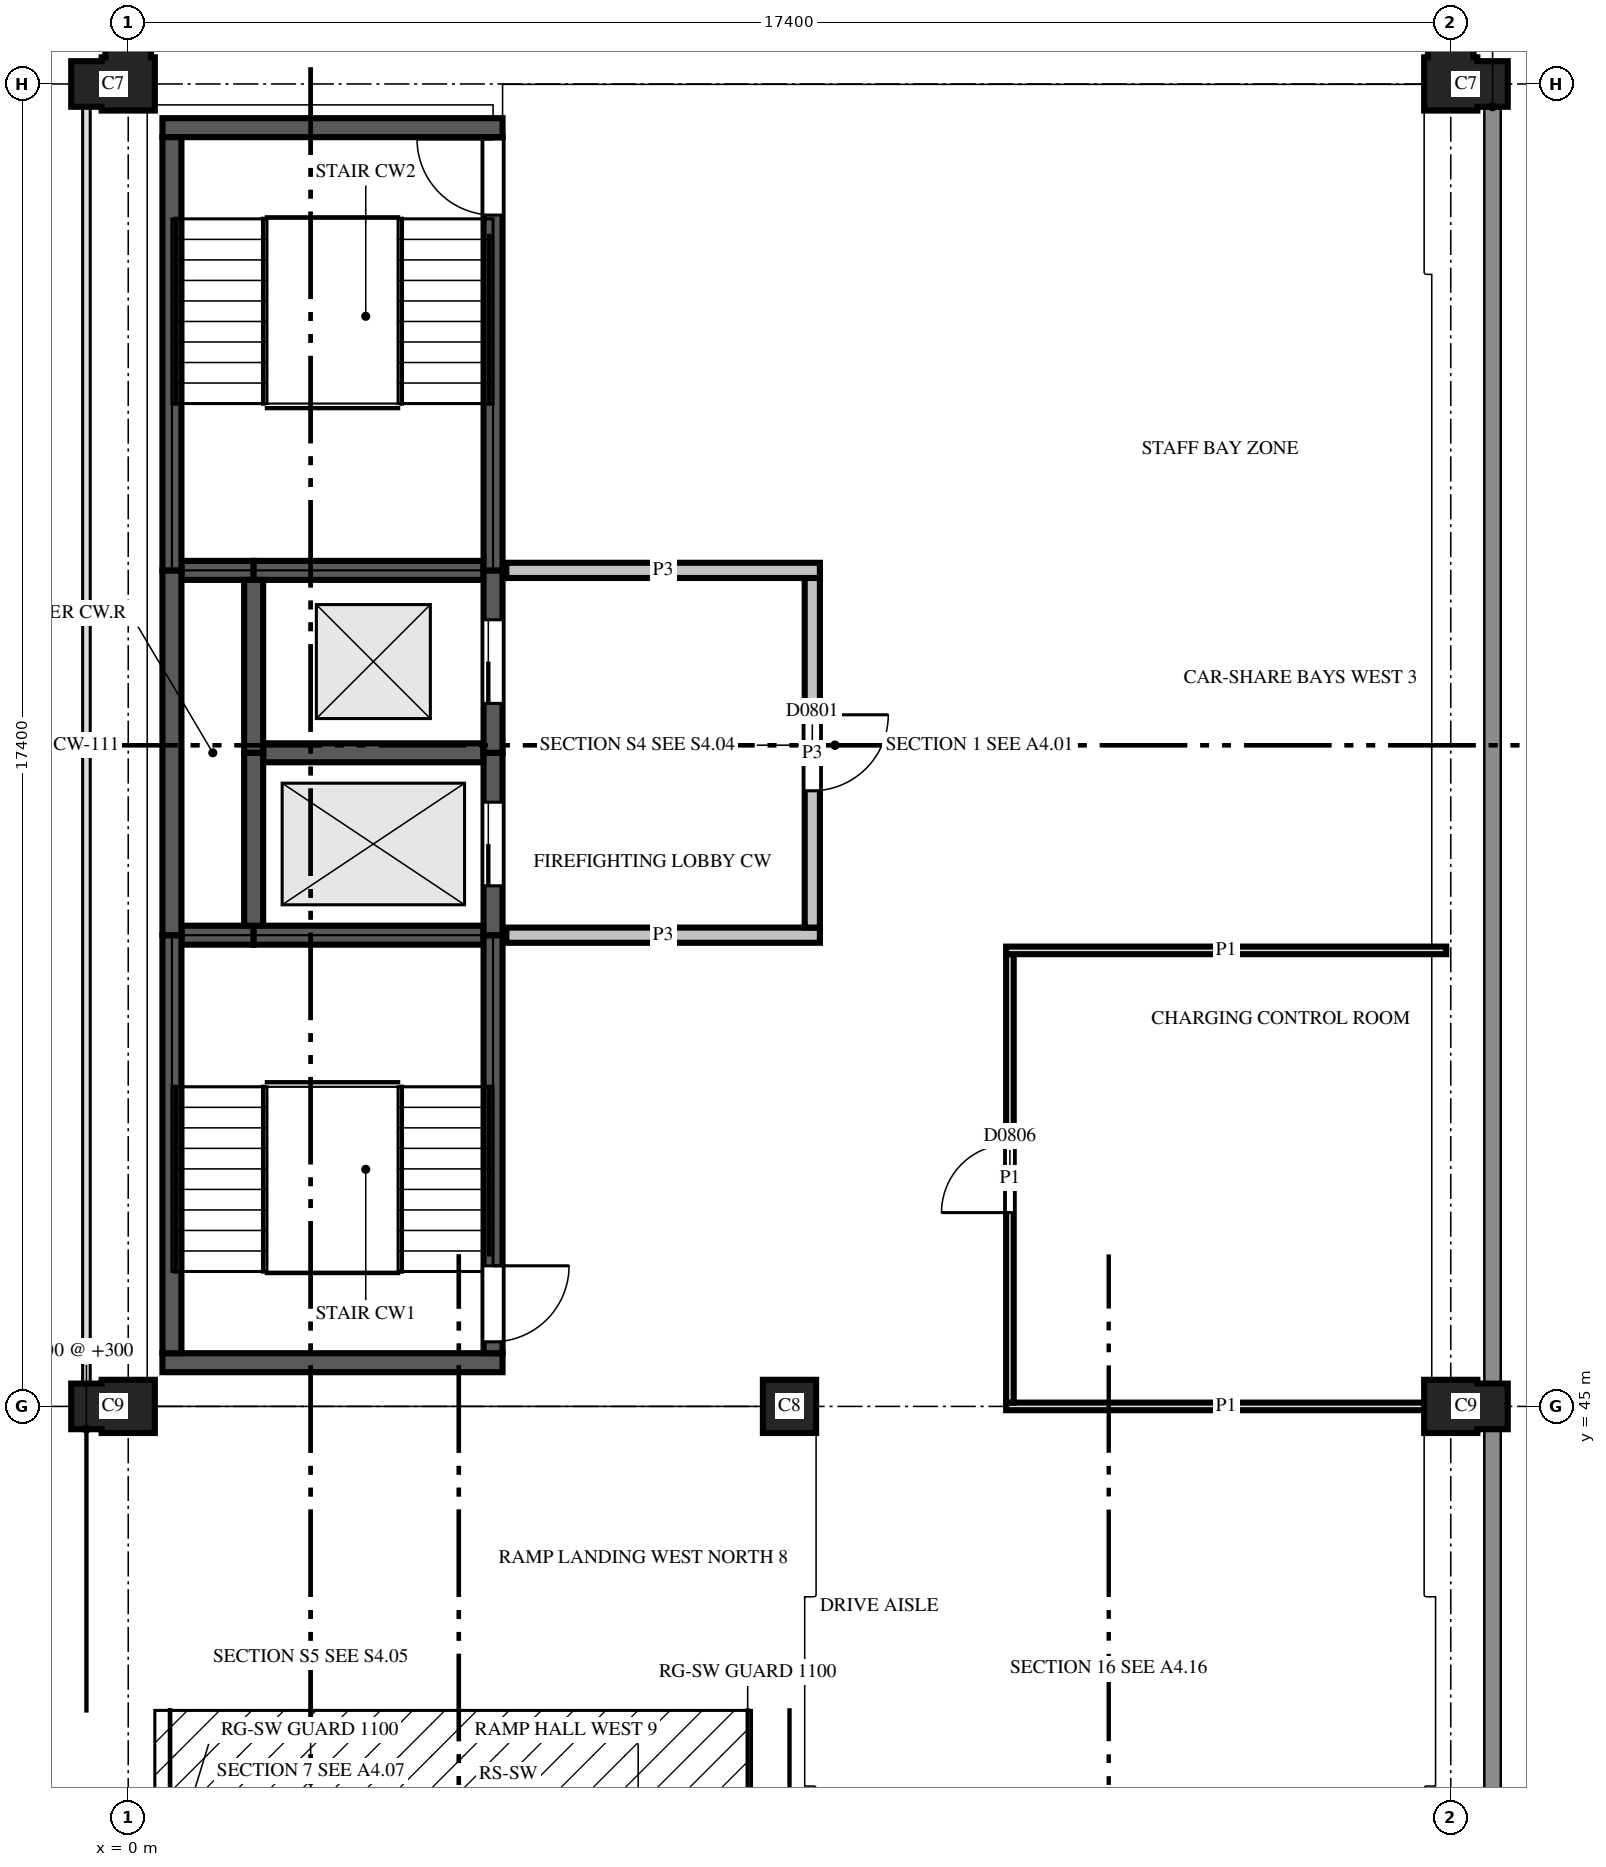
"""IFC4 building model, lengths in metres.
Left out: names, types, materials, properties, quantities, classifications, styles, units other than length and angle.
Written with IfcOpenShell. Run it as: python <this file> out.ifc"""

import sys

from ifc_helpers import new_model, si_unit, direction, frame, frame_2d, origin, place, context, subcontext, project, spatial, polyline, rectangle, outline, extrude, element, fill, save


model = new_model("IFC4")
c1 = context("Model", 3, precision=1e-05, world=origin(), true_north=direction((0.0, 1.0)))
c2 = subcontext(c1, "Body", "Model", "MODEL_VIEW")
j1 = project(units=[si_unit("LENGTHUNIT", "METRE"), si_unit("PLANEANGLEUNIT", "RADIAN")], contexts=[c1])
p1 = place(None, origin())
s1 = spatial("IfcSite", under=j1, at=p1, CompositionType="ELEMENT")
p2 = place(p1, origin())
s2 = spatial("IfcBuilding", under=s1, at=p2, CompositionType="ELEMENT")
p3 = place(p2, frame((0.0, 0.0, 30.4)))
s3 = spatial("IfcBuildingStorey", under=s2, at=p3, CompositionType="ELEMENT", Elevation=30.4)
p4 = place(p3, frame((0.0, 45.0, 0.0), z_axis=(0.0, 0.0, 1.0), x_axis=(-1.0, 0.0, 0.0)))
e1 = element("IfcColumn", 1, at=p4, inside=s3, PredefinedType="COLUMN", context=c2, shape_type="SweptSolid", body=[
    extrude(outline(polyline([(-0.35, -0.35), (0.35, -0.35), (0.35, -0.3), (0.75, -0.3), (0.75, 0.3), (0.35, 0.3), (0.35, 0.35), (-0.35, 0.35), (-0.35, -0.35)])), origin(), (0.0, 0.0, 1.0), 3.7),
])
p5 = place(p3, frame((8.7, 45.0, 0.0), z_axis=(0.0, 0.0, 1.0), x_axis=(1.0, 0.0, 0.0)))
e2 = element("IfcColumn", 2, at=p5, inside=s3, PredefinedType="COLUMN", context=c2, shape_type="SweptSolid", body=[
    extrude(outline(polyline([(-0.35, -0.35), (0.35, -0.35), (0.35, 0.35), (-0.35, 0.35), (-0.35, -0.35)])), origin(), (0.0, 0.0, 1.0), 3.7),
])
p6 = place(p3, frame((17.4, 45.0, 0.0), z_axis=(0.0, 0.0, 1.0), x_axis=(1.0, 0.0, 0.0)))
e3 = element("IfcColumn", 3, at=p6, inside=s3, PredefinedType="COLUMN", context=c2, shape_type="SweptSolid", body=[
    extrude(outline(polyline([(-0.35, -0.35), (0.35, -0.35), (0.35, -0.3), (0.75, -0.3), (0.75, 0.3), (0.35, 0.3), (0.35, 0.35), (-0.35, 0.35), (-0.35, -0.35)])), origin(), (0.0, 0.0, 1.0), 3.7),
])
for number, where, z_axis, x_axis in (
    (4, (0.0, 62.4, 0.0), (0.0, 0.0, 1.0), (0.0, 1.0, 0.0)),
    (5, (17.4, 62.4, 0.0), (0.0, 0.0, 1.0), (1.0, 0.0, 0.0)),
):
    element("IfcColumn", number, at=place(p3, frame(where, z_axis=z_axis, x_axis=x_axis)), inside=s3, PredefinedType="COLUMN", context=c2, shape_type="SweptSolid", body=[
        extrude(outline(polyline([(-0.35, -0.35), (0.35, -0.35), (0.35, -0.3), (0.75, -0.3), (0.75, 0.3), (0.35, 0.3), (0.35, 0.35), (0.3, 0.35), (0.3, 0.75), (-0.3, 0.75), (-0.3, 0.35), (-0.35, 0.35), (-0.35, -0.35)])), origin(), (0.0, 0.0, 1.0), 3.7),
    ])
p7 = place(p3, frame((0.45, 45.575, 0.0), z_axis=(0.0, 0.0, 1.0), x_axis=(1.0, 0.0, 0.0)))
e6 = element("IfcWall", 6, at=p7, inside=s3, PredefinedType="SHEAR", context=c2, shape_type="SweptSolid", body=[
    extrude(rectangle(XDim=4.475, YDim=0.25, at=frame_2d((2.238, 0.0))), origin(), (0.0, 0.0, 1.0), 3.7),
])
p8 = place(p3, frame((0.7, 51.2, 0.0), z_axis=(0.0, 0.0, 1.0), x_axis=(1.0, 0.0, 0.0)))
e7 = element("IfcWall", 7, at=p8, inside=s3, PredefinedType="SHEAR", context=c2, shape_type="SweptSolid", body=[
    extrude(rectangle(XDim=0.95, YDim=0.25, at=frame_2d((0.475, 0.0))), origin(), (0.0, 0.0, 1.0), 3.7),
])
p9 = place(p3, frame((1.65, 51.2, 0.0), z_axis=(0.0, 0.0, 1.0), x_axis=(1.0, 0.0, 0.0)))
e8 = element("IfcWall", 8, at=p9, inside=s3, PredefinedType="SHEAR", context=c2, shape_type="SweptSolid", body=[
    extrude(rectangle(XDim=3.025, YDim=0.25, at=frame_2d((1.513, 0.0))), origin(), (0.0, 0.0, 1.0), 3.7),
])
p10 = place(p3, frame((1.775, 53.6, 0.0), z_axis=(0.0, 0.0, 1.0), x_axis=(1.0, 0.0, 0.0)))
e9 = element("IfcWall", 9, at=p10, inside=s3, PredefinedType="SHEAR", context=c2, shape_type="SweptSolid", body=[
    extrude(rectangle(XDim=2.9, YDim=0.25, at=frame_2d((1.45, 0.0))), origin(), (0.0, 0.0, 1.0), 3.7),
])
p11 = place(p3, frame((0.7, 56.0, 0.0), z_axis=(0.0, 0.0, 1.0), x_axis=(1.0, 0.0, 0.0)))
e10 = element("IfcWall", 10, at=p11, inside=s3, PredefinedType="SHEAR", context=c2, shape_type="SweptSolid", body=[
    extrude(rectangle(XDim=0.95, YDim=0.25, at=frame_2d((0.475, 0.0))), origin(), (0.0, 0.0, 1.0), 3.7),
])
p12 = place(p3, frame((1.65, 56.0, 0.0), z_axis=(0.0, 0.0, 1.0), x_axis=(1.0, 0.0, 0.0)))
e11 = element("IfcWall", 11, at=p12, inside=s3, PredefinedType="SHEAR", context=c2, shape_type="SweptSolid", body=[
    extrude(rectangle(XDim=3.025, YDim=0.25, at=frame_2d((1.513, 0.0))), origin(), (0.0, 0.0, 1.0), 3.7),
])
p13 = place(p3, frame((0.45, 61.825, 0.0), z_axis=(0.0, 0.0, 1.0), x_axis=(1.0, 0.0, 0.0)))
e12 = element("IfcWall", 12, at=p13, inside=s3, PredefinedType="SHEAR", context=c2, shape_type="SweptSolid", body=[
    extrude(rectangle(XDim=4.475, YDim=0.25, at=frame_2d((2.238, 0.0))), origin(), (0.0, 0.0, 1.0), 3.7),
])
p14 = place(p3, frame((0.575, 45.7, 0.0), z_axis=(0.0, 0.0, 1.0), x_axis=(0.0, 1.0, 0.0)))
e13 = element("IfcWall", 13, at=p14, inside=s3, PredefinedType="SHEAR", context=c2, shape_type="SweptSolid", body=[
    extrude(rectangle(XDim=5.5, YDim=0.25, at=frame_2d((2.75, 0.0))), origin(), (0.0, 0.0, 1.0), 3.7),
])
p15 = place(p3, frame((0.575, 51.2, 0.0), z_axis=(0.0, 0.0, 1.0), x_axis=(0.0, 1.0, 0.0)))
e14 = element("IfcWall", 14, at=p15, inside=s3, PredefinedType="SHEAR", context=c2, shape_type="SweptSolid", body=[
    extrude(rectangle(XDim=4.8, YDim=0.25, at=frame_2d((2.4, 0.0))), origin(), (0.0, 0.0, 1.0), 3.7),
])
p16 = place(p3, frame((0.575, 56.0, 0.0), z_axis=(0.0, 0.0, 1.0), x_axis=(0.0, 1.0, 0.0)))
e15 = element("IfcWall", 15, at=p16, inside=s3, PredefinedType="SHEAR", context=c2, shape_type="SweptSolid", body=[
    extrude(rectangle(XDim=5.7, YDim=0.25, at=frame_2d((2.85, 0.0))), origin(), (0.0, 0.0, 1.0), 3.7),
])
p17 = place(p3, frame((1.65, 51.325, 0.0), z_axis=(0.0, 0.0, 1.0), x_axis=(0.0, 1.0, 0.0)))
e16 = element("IfcWall", 16, at=p17, inside=s3, PredefinedType="SHEAR", context=c2, shape_type="SweptSolid", body=[
    extrude(rectangle(XDim=2.275, YDim=0.25, at=frame_2d((1.138, 0.0))), origin(), (0.0, 0.0, 1.0), 3.7),
])
p18 = place(p3, frame((1.65, 53.6, 0.0), z_axis=(0.0, 0.0, 1.0), x_axis=(0.0, 1.0, 0.0)))
e17 = element("IfcWall", 17, at=p18, inside=s3, PredefinedType="SHEAR", context=c2, shape_type="SweptSolid", body=[
    extrude(rectangle(XDim=2.275, YDim=0.25, at=frame_2d((1.137, 0.0))), origin(), (0.0, 0.0, 1.0), 3.7),
])
p19 = place(p3, frame((4.8, 45.7, 0.0), z_axis=(0.0, 0.0, 1.0), x_axis=(0.0, 1.0, 0.0)))
e18 = element("IfcWall", 18, at=p19, inside=s3, PredefinedType="SHEAR", context=c2, shape_type="SweptSolid", body=[
    extrude(rectangle(XDim=5.5, YDim=0.25, at=frame_2d((2.75, 0.0))), origin(), (0.0, 0.0, 1.0), 3.7),
])
p20 = place(p19, frame((0.15, 0.0, 0.0)))
e19 = element("IfcOpeningElement", 19, at=p20, cuts=e18, PredefinedType="OPENING", context=c2, shape_type="SweptSolid", body=[
    extrude(rectangle(XDim=1.0, YDim=2.1, at=frame_2d((0.5, 1.05))), frame((0.0, 0.135, 0.0), z_axis=(0.0, -1.0, 0.0), x_axis=(1.0, 0.0, 0.0)), (0.0, 0.0, 1.0), 0.27),
])
p21 = place(p3, frame((4.8, 51.2, 0.0), z_axis=(0.0, 0.0, 1.0), x_axis=(0.0, 1.0, 0.0)))
e20 = element("IfcWall", 20, at=p21, inside=s3, PredefinedType="SHEAR", context=c2, shape_type="SweptSolid", body=[
    extrude(rectangle(XDim=2.4, YDim=0.25, at=frame_2d((1.2, 0.0))), origin(), (0.0, 0.0, 1.0), 3.7),
])
p22 = place(p21, frame((0.65, 0.0, 0.0)))
e21 = element("IfcOpeningElement", 21, at=p22, cuts=e20, PredefinedType="OPENING", context=c2, shape_type="SweptSolid", body=[
    extrude(rectangle(XDim=1.1, YDim=2.1, at=frame_2d((0.55, 1.05))), frame((0.0, 0.135, 0.0), z_axis=(0.0, -1.0, 0.0), x_axis=(1.0, 0.0, 0.0)), (0.0, 0.0, 1.0), 0.27),
])
p23 = place(p3, frame((4.8, 53.6, 0.0), z_axis=(0.0, 0.0, 1.0), x_axis=(0.0, 1.0, 0.0)))
e22 = element("IfcWall", 22, at=p23, inside=s3, PredefinedType="SHEAR", context=c2, shape_type="SweptSolid", body=[
    extrude(rectangle(XDim=2.4, YDim=0.25, at=frame_2d((1.2, 0.0))), origin(), (0.0, 0.0, 1.0), 3.7),
])
p24 = place(p23, frame((0.65, 0.0, 0.0)))
e23 = element("IfcOpeningElement", 23, at=p24, cuts=e22, PredefinedType="OPENING", context=c2, shape_type="SweptSolid", body=[
    extrude(rectangle(XDim=1.1, YDim=2.1, at=frame_2d((0.55, 1.05))), frame((0.0, 0.135, 0.0), z_axis=(0.0, -1.0, 0.0), x_axis=(1.0, 0.0, 0.0)), (0.0, 0.0, 1.0), 0.27),
])
p25 = place(p3, frame((4.8, 56.0, 0.0), z_axis=(0.0, 0.0, 1.0), x_axis=(0.0, 1.0, 0.0)))
e24 = element("IfcWall", 24, at=p25, inside=s3, PredefinedType="SHEAR", context=c2, shape_type="SweptSolid", body=[
    extrude(rectangle(XDim=5.7, YDim=0.25, at=frame_2d((2.85, 0.0))), origin(), (0.0, 0.0, 1.0), 3.7),
])
p26 = place(p25, frame((4.675, 0.0, 0.0)))
e25 = element("IfcOpeningElement", 25, at=p26, cuts=e24, PredefinedType="OPENING", context=c2, shape_type="SweptSolid", body=[
    extrude(rectangle(XDim=1.0, YDim=2.1, at=frame_2d((0.5, 1.05))), frame((0.0, 0.135, 0.0), z_axis=(0.0, -1.0, 0.0), x_axis=(1.0, 0.0, 0.0)), (0.0, 0.0, 1.0), 0.27),
])
p27 = place(p3, frame((11.55, 45.0, 0.0), z_axis=(0.0, 0.0, 1.0), x_axis=(1.0, 0.0, 0.0)))
e26 = element("IfcWall", 26, at=p27, inside=s3, PredefinedType="PARTITIONING", context=c2, shape_type="SweptSolid", body=[
    extrude(rectangle(XDim=5.79, YDim=0.1, at=frame_2d((2.895, 0.0))), origin(), (0.0, 0.0, 1.0), 2.88),
])
p28 = place(p3, frame((11.6, 50.95, 0.0), z_axis=(0.0, 0.0, 1.0), x_axis=(0.0, -1.0, 0.0)))
e27 = element("IfcWall", 27, at=p28, inside=s3, PredefinedType="PARTITIONING", context=c2, shape_type="SweptSolid", body=[
    extrude(rectangle(XDim=5.9, YDim=0.1, at=frame_2d((2.95, 0.0))), origin(), (0.0, 0.0, 1.0), 2.88),
])
p29 = place(p28, frame((2.5, 0.0, 0.0)))
e28 = element("IfcOpeningElement", 28, at=p29, cuts=e27, PredefinedType="OPENING", context=c2, shape_type="SweptSolid", body=[
    extrude(rectangle(XDim=0.9, YDim=2.1, at=frame_2d((0.45, 1.05))), frame((0.0, 0.06, 0.0), z_axis=(0.0, -1.0, 0.0), x_axis=(1.0, 0.0, 0.0)), (0.0, 0.0, 1.0), 0.12),
])
p30 = place(p3, frame((17.34, 51.0, 0.0), z_axis=(0.0, 0.0, 1.0), x_axis=(-1.0, 0.0, 0.0)))
e29 = element("IfcWall", 29, at=p30, inside=s3, PredefinedType="PARTITIONING", context=c2, shape_type="SweptSolid", body=[
    extrude(rectangle(XDim=5.79, YDim=0.1, at=frame_2d((2.895, 0.0))), origin(), (0.0, 0.0, 1.0), 2.88),
])
p31 = place(p3, frame((4.975, 51.2, 0.0), z_axis=(0.0, 0.0, 1.0), x_axis=(1.0, 0.0, 0.0)))
e30 = element("IfcWall", 30, at=p31, inside=s3, PredefinedType="PARTITIONING", context=c2, shape_type="SweptSolid", body=[
    extrude(rectangle(XDim=4.125, YDim=0.2, at=frame_2d((2.062, 0.0))), origin(), (0.0, 0.0, 1.0), 2.88),
])
p32 = place(p3, frame((9.0, 51.3, 0.0), z_axis=(0.0, 0.0, 1.0), x_axis=(0.0, 1.0, 0.0)))
e31 = element("IfcWall", 31, at=p32, inside=s3, PredefinedType="PARTITIONING", context=c2, shape_type="SweptSolid", body=[
    extrude(rectangle(XDim=4.6, YDim=0.2, at=frame_2d((2.3, 0.0))), origin(), (0.0, 0.0, 1.0), 2.88),
])
p33 = place(p32, frame((1.8, 0.0, 0.0)))
e32 = element("IfcOpeningElement", 32, at=p33, cuts=e31, PredefinedType="OPENING", context=c2, shape_type="SweptSolid", body=[
    extrude(rectangle(XDim=1.0, YDim=2.1, at=frame_2d((0.5, 1.05))), frame((0.0, 0.11, 0.0), z_axis=(0.0, -1.0, 0.0), x_axis=(1.0, 0.0, 0.0)), (0.0, 0.0, 1.0), 0.22),
])
p34 = place(p3, frame((9.1, 56.0, 0.0), z_axis=(0.0, 0.0, 1.0), x_axis=(-1.0, 0.0, 0.0)))
e33 = element("IfcWall", 33, at=p34, inside=s3, PredefinedType="PARTITIONING", context=c2, shape_type="SweptSolid", body=[
    extrude(rectangle(XDim=4.125, YDim=0.2, at=frame_2d((2.062, 0.0))), origin(), (0.0, 0.0, 1.0), 2.88),
])
p35 = place(p33, origin())
e34 = element("IfcDoor", 34, at=p35, inside=s3, OperationType="SINGLE_SWING_RIGHT", PredefinedType="DOOR", context=c2, shape_type="SweptSolid", body=[
    extrude(rectangle(XDim=1.0, YDim=2.1, at=frame_2d((0.5, 1.05))), frame((0.0, 0.025, 0.0), z_axis=(0.0, -1.0, 0.0), x_axis=(1.0, 0.0, 0.0)), (0.0, 0.0, 1.0), 0.05),
])
fill(e32, e34)
p36 = place(p29, origin())
e35 = element("IfcDoor", 35, at=p36, inside=s3, OperationType="SINGLE_SWING_RIGHT", PredefinedType="DOOR", context=c2, shape_type="SweptSolid", body=[
    extrude(rectangle(XDim=0.9, YDim=2.1, at=frame_2d((0.45, 1.05))), frame((0.0, 0.025, 0.0), z_axis=(0.0, -1.0, 0.0), x_axis=(1.0, 0.0, 0.0)), (0.0, 0.0, 1.0), 0.05),
])
fill(e28, e35)
p37 = place(p22, origin())
e36 = element("IfcDoor", 36, at=p37, inside=s3, OperationType="SLIDING_TO_LEFT", PredefinedType="DOOR", context=c2, shape_type="SweptSolid", body=[
    extrude(rectangle(XDim=1.1, YDim=2.1, at=frame_2d((0.55, 1.05))), frame((0.0, 0.025, 0.0), z_axis=(0.0, -1.0, 0.0), x_axis=(1.0, 0.0, 0.0)), (0.0, 0.0, 1.0), 0.05),
])
fill(e21, e36)
p38 = place(p24, origin())
e37 = element("IfcDoor", 37, at=p38, inside=s3, OperationType="SLIDING_TO_LEFT", PredefinedType="DOOR", context=c2, shape_type="SweptSolid", body=[
    extrude(rectangle(XDim=1.1, YDim=2.1, at=frame_2d((0.55, 1.05))), frame((0.0, 0.025, 0.0), z_axis=(0.0, -1.0, 0.0), x_axis=(1.0, 0.0, 0.0)), (0.0, 0.0, 1.0), 0.05),
])
fill(e23, e37)
p39 = place(p26, origin())
e38 = element("IfcDoor", 38, at=p39, inside=s3, OperationType="SINGLE_SWING_LEFT", PredefinedType="DOOR", context=c2, shape_type="SweptSolid", body=[
    extrude(rectangle(XDim=1.0, YDim=2.1, at=frame_2d((0.5, 1.05))), frame((0.0, 0.025, 0.0), z_axis=(0.0, -1.0, 0.0), x_axis=(1.0, 0.0, 0.0)), (0.0, 0.0, 1.0), 0.05),
])
fill(e25, e38)
p40 = place(p20, origin())
e39 = element("IfcDoor", 39, at=p40, inside=s3, OperationType="SINGLE_SWING_RIGHT", PredefinedType="DOOR", context=c2, shape_type="SweptSolid", body=[
    extrude(rectangle(XDim=1.0, YDim=2.1, at=frame_2d((0.5, 1.05))), frame((0.0, 0.025, 0.0), z_axis=(0.0, -1.0, 0.0), x_axis=(1.0, 0.0, 0.0)), (0.0, 0.0, 1.0), 0.05),
])
fill(e19, e39)
save(model, sys.argv[1])
